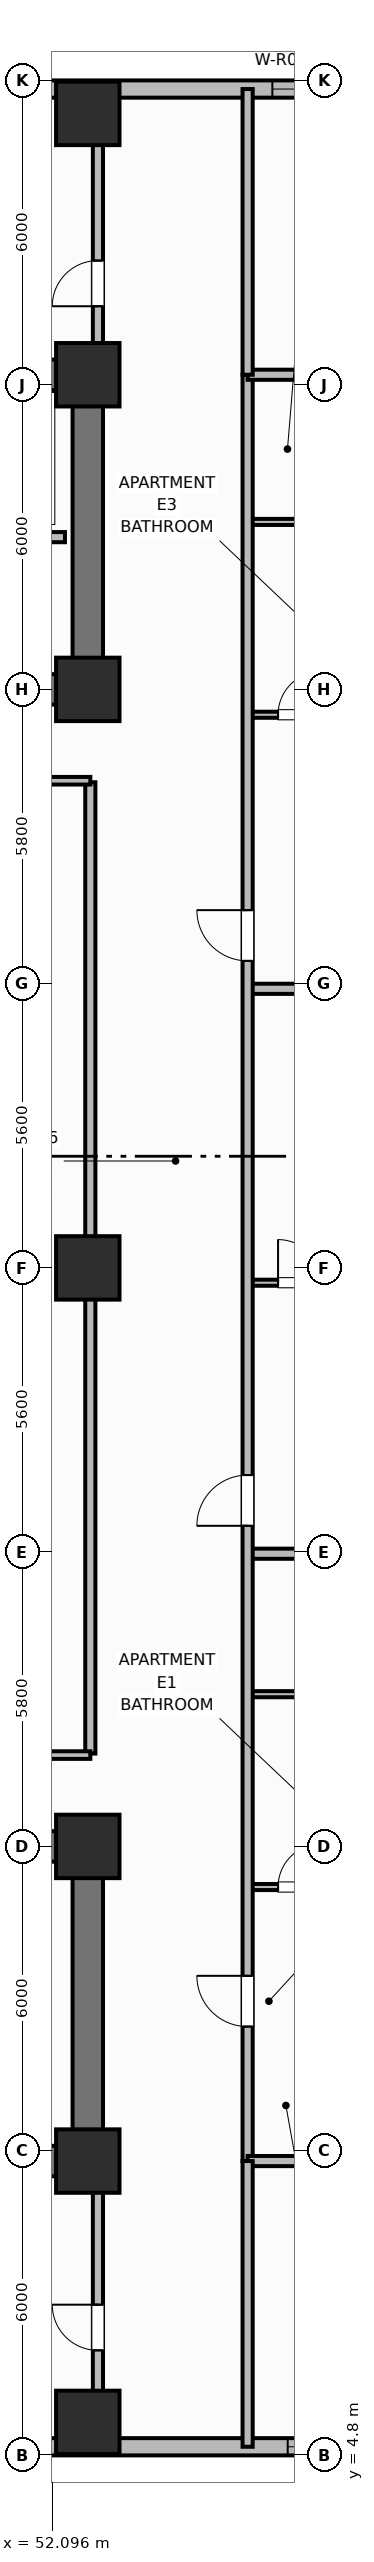
"""IFC4 building model, lengths in metres.
Left out: names, types, materials, properties, quantities, classifications, styles, units other than length and angle.
Written with IfcOpenShell. Run it as: python <this file> out.ifc"""

import sys

from ifc_helpers import new_model, si_unit, direction, frame, frame_2d, origin, origin_2d, place, context, subcontext, project, spatial, rectangle, extrude, element, fill, save


model = new_model("IFC4")
c1 = context("Model", 3, precision=1e-05, world=origin(), true_north=direction((0.0, 1.0)))
c2 = subcontext(c1, "Body", "Model", "MODEL_VIEW")
j1 = project(units=[si_unit("LENGTHUNIT", "METRE"), si_unit("PLANEANGLEUNIT", "RADIAN")], contexts=[c1])
p1 = place(None, origin())
s1 = spatial("IfcSite", under=j1, at=p1, CompositionType="ELEMENT")
p2 = place(p1, origin())
s2 = spatial("IfcBuilding", under=s1, at=p2, CompositionType="ELEMENT")
p3 = place(p2, frame((0.0, 0.0, 28.8)))
s3 = spatial("IfcBuildingStorey", under=s2, at=p3, CompositionType="ELEMENT", Elevation=28.8)
p4 = place(p3, frame((52.8, 10.6, 0.0), z_axis=(0.0, 0.0, 1.0), x_axis=(-1.0, 0.0, 0.0)))
e1 = element("IfcWall", 1, at=p4, inside=s3, PredefinedType="SHEAR", context=c2, shape_type="SweptSolid", body=[
    extrude(rectangle(XDim=27.2, YDim=0.6, at=frame_2d((13.6, 0.0))), origin(), (0.0, 0.0, 1.0), 3.7),
])
p5 = place(p3, frame((52.8, 10.9, 0.0), z_axis=(0.0, 0.0, 1.0), x_axis=(0.0, 1.0, 0.0)))
e2 = element("IfcWall", 2, at=p5, inside=s3, PredefinedType="SHEAR", context=c2, shape_type="SweptSolid", body=[
    extrude(rectangle(XDim=5.6, YDim=0.6, at=frame_2d((2.8, 0.0))), origin(), (0.0, 0.0, 1.0), 3.7),
])
p6 = place(p3, frame((25.6, 16.8, 0.0), z_axis=(0.0, 0.0, 1.0), x_axis=(1.0, 0.0, 0.0)))
e3 = element("IfcWall", 3, at=p6, inside=s3, PredefinedType="SHEAR", context=c2, shape_type="SweptSolid", body=[
    extrude(rectangle(XDim=27.2, YDim=0.6, at=frame_2d((13.6, 0.0))), origin(), (0.0, 0.0, 1.0), 3.7),
])
p7 = place(p6, frame((1.9, 0.0, 0.0)))
e4 = element("IfcOpeningElement", 4, at=p7, cuts=e3, PredefinedType="OPENING", context=c2, shape_type="SweptSolid", body=[
    extrude(rectangle(XDim=1.1, YDim=2.15, at=frame_2d((0.55, 1.075))), frame((0.0, 0.31, 0.0), z_axis=(0.0, -1.0, 0.0), x_axis=(1.0, 0.0, 0.0)), (0.0, 0.0, 1.0), 0.62),
])
p8 = place(p6, frame((13.0, 0.0, 0.0)))
e5 = element("IfcOpeningElement", 5, at=p8, cuts=e3, PredefinedType="OPENING", context=c2, shape_type="SweptSolid", body=[
    extrude(rectangle(XDim=1.2, YDim=2.15, at=frame_2d((0.6, 1.075))), frame((0.0, 0.31, 0.0), z_axis=(0.0, -1.0, 0.0), x_axis=(1.0, 0.0, 0.0)), (0.0, 0.0, 1.0), 0.62),
])
p9 = place(p6, frame((20.4, 0.0, 0.0)))
e6 = element("IfcOpeningElement", 6, at=p9, cuts=e3, PredefinedType="OPENING", context=c2, shape_type="SweptSolid", body=[
    extrude(rectangle(XDim=1.3, YDim=2.2, at=frame_2d((0.65, 1.1))), frame((0.0, 0.31, 0.0), z_axis=(0.0, -1.0, 0.0), x_axis=(1.0, 0.0, 0.0)), (0.0, 0.0, 1.0), 0.62),
])
p10 = place(p6, frame((24.65, 0.0, 0.0)))
e7 = element("IfcOpeningElement", 7, at=p10, cuts=e3, PredefinedType="OPENING", context=c2, shape_type="SweptSolid", body=[
    extrude(rectangle(XDim=0.85, YDim=2.1, at=frame_2d((0.425, 1.05))), frame((0.0, 0.31, 0.0), z_axis=(0.0, -1.0, 0.0), x_axis=(1.0, 0.0, 0.0)), (0.0, 0.0, 1.0), 0.62),
])
p11 = place(p3, frame((25.6, 45.8, 0.0), z_axis=(0.0, 0.0, 1.0), x_axis=(1.0, 0.0, 0.0)))
e8 = element("IfcWall", 8, at=p11, inside=s3, PredefinedType="SHEAR", context=c2, shape_type="SweptSolid", body=[
    extrude(rectangle(XDim=27.2, YDim=0.6, at=frame_2d((13.6, 0.0))), origin(), (0.0, 0.0, 1.0), 3.7),
])
p12 = place(p3, frame((52.8, 39.9, 0.0), z_axis=(0.0, 0.0, 1.0), x_axis=(0.0, 1.0, 0.0)))
e9 = element("IfcWall", 9, at=p12, inside=s3, PredefinedType="SHEAR", context=c2, shape_type="SweptSolid", body=[
    extrude(rectangle(XDim=5.6, YDim=0.6, at=frame_2d((2.8, 0.0))), origin(), (0.0, 0.0, 1.0), 3.7),
])
p13 = place(p3, frame((52.8, 39.6, 0.0), z_axis=(0.0, 0.0, 1.0), x_axis=(-1.0, 0.0, 0.0)))
e10 = element("IfcWall", 10, at=p13, inside=s3, PredefinedType="SHEAR", context=c2, shape_type="SweptSolid", body=[
    extrude(rectangle(XDim=27.2, YDim=0.6, at=frame_2d((13.6, 0.0))), origin(), (0.0, 0.0, 1.0), 3.7),
])
p14 = place(p13, frame((24.2, 0.0, 0.0)))
e11 = element("IfcOpeningElement", 11, at=p14, cuts=e10, PredefinedType="OPENING", context=c2, shape_type="SweptSolid", body=[
    extrude(rectangle(XDim=1.1, YDim=2.15, at=frame_2d((0.55, 1.075))), frame((0.0, 0.31, 0.0), z_axis=(0.0, -1.0, 0.0), x_axis=(1.0, 0.0, 0.0)), (0.0, 0.0, 1.0), 0.62),
])
p15 = place(p13, frame((15.1, 0.0, 0.0)))
e12 = element("IfcOpeningElement", 12, at=p15, cuts=e10, PredefinedType="OPENING", context=c2, shape_type="SweptSolid", body=[
    extrude(rectangle(XDim=1.2, YDim=2.15, at=frame_2d((0.6, 1.075))), frame((0.0, 0.31, 0.0), z_axis=(0.0, -1.0, 0.0), x_axis=(1.0, 0.0, 0.0)), (0.0, 0.0, 1.0), 0.62),
])
p16 = place(p13, frame((11.6, 0.0, 0.0)))
e13 = element("IfcOpeningElement", 13, at=p16, cuts=e10, PredefinedType="OPENING", context=c2, shape_type="SweptSolid", body=[
    extrude(rectangle(XDim=0.9, YDim=2.1, at=frame_2d((0.45, 1.05))), frame((0.0, 0.31, 0.0), z_axis=(0.0, -1.0, 0.0), x_axis=(1.0, 0.0, 0.0)), (0.0, 0.0, 1.0), 0.62),
])
p17 = place(p13, frame((3.6, 0.0, 0.0)))
e14 = element("IfcOpeningElement", 14, at=p17, cuts=e10, PredefinedType="OPENING", context=c2, shape_type="SweptSolid", body=[
    extrude(rectangle(XDim=1.0, YDim=2.15, at=frame_2d((0.5, 1.075))), frame((0.0, 0.31, 0.0), z_axis=(0.0, -1.0, 0.0), x_axis=(1.0, 0.0, 0.0)), (0.0, 0.0, 1.0), 0.62),
])
for number, where, z_axis, x_axis in (
    (15, (52.8, 10.6, 0.0), (0.0, 0.0, 1.0), (1.0, 0.0, 0.0)),
    (16, (52.8, 16.8, 0.0), (0.0, 0.0, 1.0), (1.0, 0.0, 0.0)),
    (17, (52.8, 39.6, 0.0), (0.0, 0.0, 1.0), (1.0, 0.0, 0.0)),
    (18, (52.8, 45.8, 0.0), (0.0, 0.0, 1.0), (1.0, 0.0, 0.0)),
    (19, (52.8, 28.2, 0.0), (0.0, 0.0, 1.0), (1.0, 0.0, 0.0)),
    (20, (52.8, 5.45, 0.0), (0.0, 0.0, 1.0), (1.0, 0.0, 0.0)),
    (21, (52.8, 50.95, 0.0), (0.0, 0.0, 1.0), (1.0, 0.0, 0.0)),
):
    element("IfcColumn", number, at=place(p3, frame(where, z_axis=z_axis, x_axis=x_axis)), inside=s3, PredefinedType="COLUMN", context=c2, shape_type="SweptSolid", body=[
        extrude(rectangle(XDim=1.25, YDim=1.25, at=origin_2d()), origin(), (0.0, 0.0, 1.0), 3.7),
    ])
p18 = place(p3, frame((42.4, 4.97, 0.0), z_axis=(0.0, 0.0, 1.0), x_axis=(1.0, 0.0, 0.0)))
e22 = element("IfcWall", 22, at=p18, inside=s3, PredefinedType="SOLIDWALL", context=c2, shape_type="SweptSolid", body=[
    extrude(rectangle(XDim=17.4, YDim=0.34, at=frame_2d((8.7, 0.0))), origin(), (0.0, 0.0, 1.0), 2.7),
])
p19 = place(p18, frame((4.68, 0.0, 0.68)))
e23 = element("IfcOpeningElement", 23, at=p19, cuts=e22, PredefinedType="OPENING", context=c2, shape_type="SweptSolid", body=[
    extrude(rectangle(XDim=1.6, YDim=1.9, at=frame_2d((0.8, 0.95))), frame((0.0, 0.18, 0.0), z_axis=(0.0, -1.0, 0.0), x_axis=(1.0, 0.0, 0.0)), (0.0, 0.0, 1.0), 0.36),
])
p20 = place(p18, frame((7.55, 0.0, 0.68)))
e24 = element("IfcOpeningElement", 24, at=p20, cuts=e22, PredefinedType="OPENING", context=c2, shape_type="SweptSolid", body=[
    extrude(rectangle(XDim=1.6, YDim=1.9, at=frame_2d((0.8, 0.95))), frame((0.0, 0.18, 0.0), z_axis=(0.0, -1.0, 0.0), x_axis=(1.0, 0.0, 0.0)), (0.0, 0.0, 1.0), 0.36),
])
p21 = place(p18, frame((14.34, 0.0, 0.68)))
e25 = element("IfcOpeningElement", 25, at=p21, cuts=e22, PredefinedType="OPENING", context=c2, shape_type="SweptSolid", body=[
    extrude(rectangle(XDim=1.6, YDim=1.9, at=frame_2d((0.8, 0.95))), frame((0.0, 0.18, 0.0), z_axis=(0.0, -1.0, 0.0), x_axis=(1.0, 0.0, 0.0)), (0.0, 0.0, 1.0), 0.36),
])
p22 = place(p3, frame((59.8, 51.43, 0.0), z_axis=(0.0, 0.0, 1.0), x_axis=(-1.0, 0.0, 0.0)))
e26 = element("IfcWall", 26, at=p22, inside=s3, PredefinedType="SOLIDWALL", context=c2, shape_type="SweptSolid", body=[
    extrude(rectangle(XDim=17.4, YDim=0.34, at=frame_2d((8.7, 0.0))), origin(), (0.0, 0.0, 1.0), 2.7),
])
p23 = place(p22, frame((1.262, 0.0, 0.68)))
e27 = element("IfcOpeningElement", 27, at=p23, cuts=e26, PredefinedType="OPENING", context=c2, shape_type="SweptSolid", body=[
    extrude(rectangle(XDim=2.1, YDim=1.9, at=frame_2d((1.05, 0.95))), frame((0.0, 0.18, 0.0), z_axis=(0.0, -1.0, 0.0), x_axis=(1.0, 0.0, 0.0)), (0.0, 0.0, 1.0), 0.36),
])
p24 = place(p22, frame((9.663, 0.0, 0.68)))
e28 = element("IfcOpeningElement", 28, at=p24, cuts=e26, PredefinedType="OPENING", context=c2, shape_type="SweptSolid", body=[
    extrude(rectangle(XDim=2.1, YDim=1.9, at=frame_2d((1.05, 0.95))), frame((0.0, 0.18, 0.0), z_axis=(0.0, -1.0, 0.0), x_axis=(1.0, 0.0, 0.0)), (0.0, 0.0, 1.0), 0.36),
])
p25 = place(p3, frame((52.35, 42.6, 0.0), z_axis=(0.0, 0.0, 1.0), x_axis=(-1.0, 0.0, 0.0)))
e29 = element("IfcWall", 29, at=p25, inside=s3, PredefinedType="PARTITIONING", context=c2, shape_type="SweptSolid", body=[
    extrude(rectangle(XDim=8.8, YDim=0.2, at=frame_2d((4.4, 0.0))), origin(), (0.0, 0.0, 1.0), 2.53),
])
p26 = place(p3, frame((52.85, 18.63, 0.0), z_axis=(0.0, 0.0, 1.0), x_axis=(0.0, 1.0, 0.0)))
e30 = element("IfcWall", 30, at=p26, inside=s3, PredefinedType="PARTITIONING", context=c2, shape_type="SweptSolid", body=[
    extrude(rectangle(XDim=19.14, YDim=0.2, at=frame_2d((9.57, 0.0))), origin(), (0.0, 0.0, 1.0), 2.53),
])
for number, where, z_axis, x_axis in (
    (31, (40.35, 18.6, 0.0), (0.0, 0.0, 1.0), (1.0, 0.0, 0.0)),
    (32, (40.35, 37.8, 0.0), (0.0, 0.0, 1.0), (1.0, 0.0, 0.0)),
):
    element("IfcWall", number, at=place(p3, frame(where, z_axis=z_axis, x_axis=x_axis)), inside=s3, PredefinedType="PARTITIONING", context=c2, shape_type="SweptSolid", body=[
        extrude(rectangle(XDim=12.5, YDim=0.15, at=frame_2d((6.25, 0.0))), origin(), (0.0, 0.0, 1.0), 2.53),
    ])
p27 = place(p3, frame((55.95, 16.0, 0.0), z_axis=(0.0, 0.0, 1.0), x_axis=(1.0, 0.0, 0.0)))
e33 = element("IfcWall", 33, at=p27, inside=s3, PredefinedType="PARTITIONING", context=c2, shape_type="SweptSolid", body=[
    extrude(rectangle(XDim=2.25, YDim=0.12, at=frame_2d((1.125, 0.0))), origin(), (0.0, 0.0, 1.0), 2.53),
])
p28 = place(p27, frame((0.6, 0.0, 0.0)))
e34 = element("IfcOpeningElement", 34, at=p28, cuts=e33, PredefinedType="OPENING", context=c2, shape_type="SweptSolid", body=[
    extrude(rectangle(XDim=0.85, YDim=2.1, at=frame_2d((0.425, 1.05))), frame((0.0, 0.07, 0.0), z_axis=(0.0, -1.0, 0.0), x_axis=(1.0, 0.0, 0.0)), (0.0, 0.0, 1.0), 0.14),
])
p29 = place(p3, frame((55.95, 19.8, 0.0), z_axis=(0.0, 0.0, 1.0), x_axis=(1.0, 0.0, 0.0)))
e35 = element("IfcWall", 35, at=p29, inside=s3, PredefinedType="PARTITIONING", context=c2, shape_type="SweptSolid", body=[
    extrude(rectangle(XDim=2.25, YDim=0.12, at=frame_2d((1.125, 0.0))), origin(), (0.0, 0.0, 1.0), 2.53),
])
p30 = place(p3, frame((55.95, 22.568, 0.0), z_axis=(0.0, 0.0, 1.0), x_axis=(1.0, 0.0, 0.0)))
e36 = element("IfcWall", 36, at=p30, inside=s3, PredefinedType="PARTITIONING", context=c2, shape_type="SweptSolid", body=[
    extrude(rectangle(XDim=7.88, YDim=0.2, at=frame_2d((3.94, 0.0))), origin(), (0.0, 0.0, 1.0), 2.53),
])
p31 = place(p3, frame((55.95, 27.908, 0.0), z_axis=(0.0, 0.0, 1.0), x_axis=(1.0, 0.0, 0.0)))
e37 = element("IfcWall", 37, at=p31, inside=s3, PredefinedType="PARTITIONING", context=c2, shape_type="SweptSolid", body=[
    extrude(rectangle(XDim=2.25, YDim=0.12, at=frame_2d((1.125, 0.0))), origin(), (0.0, 0.0, 1.0), 2.53),
])
p32 = place(p31, frame((0.6, 0.0, 0.0)))
e38 = element("IfcOpeningElement", 38, at=p32, cuts=e37, PredefinedType="OPENING", context=c2, shape_type="SweptSolid", body=[
    extrude(rectangle(XDim=0.85, YDim=2.1, at=frame_2d((0.425, 1.05))), frame((0.0, 0.07, 0.0), z_axis=(0.0, -1.0, 0.0), x_axis=(1.0, 0.0, 0.0)), (0.0, 0.0, 1.0), 0.14),
])
p33 = place(p3, frame((55.95, 33.7, 0.0), z_axis=(0.0, 0.0, 1.0), x_axis=(1.0, 0.0, 0.0)))
e39 = element("IfcWall", 39, at=p33, inside=s3, PredefinedType="PARTITIONING", context=c2, shape_type="SweptSolid", body=[
    extrude(rectangle(XDim=7.88, YDim=0.2, at=frame_2d((3.94, 0.0))), origin(), (0.0, 0.0, 1.0), 2.53),
])
p34 = place(p3, frame((55.95, 39.1, 0.0), z_axis=(0.0, 0.0, 1.0), x_axis=(1.0, 0.0, 0.0)))
e40 = element("IfcWall", 40, at=p34, inside=s3, PredefinedType="PARTITIONING", context=c2, shape_type="SweptSolid", body=[
    extrude(rectangle(XDim=2.25, YDim=0.12, at=frame_2d((1.125, 0.0))), origin(), (0.0, 0.0, 1.0), 2.53),
])
p35 = place(p34, frame((0.6, 0.0, 0.0)))
e41 = element("IfcOpeningElement", 41, at=p35, cuts=e40, PredefinedType="OPENING", context=c2, shape_type="SweptSolid", body=[
    extrude(rectangle(XDim=0.85, YDim=2.1, at=frame_2d((0.425, 1.05))), frame((0.0, 0.07, 0.0), z_axis=(0.0, -1.0, 0.0), x_axis=(1.0, 0.0, 0.0)), (0.0, 0.0, 1.0), 0.14),
])
p36 = place(p3, frame((55.95, 42.9, 0.0), z_axis=(0.0, 0.0, 1.0), x_axis=(1.0, 0.0, 0.0)))
e42 = element("IfcWall", 42, at=p36, inside=s3, PredefinedType="PARTITIONING", context=c2, shape_type="SweptSolid", body=[
    extrude(rectangle(XDim=2.25, YDim=0.12, at=frame_2d((1.125, 0.0))), origin(), (0.0, 0.0, 1.0), 2.53),
])
p37 = place(p3, frame((55.95, 10.6, 0.0), z_axis=(0.0, 0.0, 1.0), x_axis=(0.0, 1.0, 0.0)))
e43 = element("IfcWall", 43, at=p37, inside=s3, PredefinedType="PARTITIONING", context=c2, shape_type="SweptSolid", body=[
    extrude(rectangle(XDim=35.2, YDim=0.2, at=frame_2d((17.6, 0.0))), origin(), (0.0, 0.0, 1.0), 2.53),
])
p38 = place(p37, frame((2.65, 0.0, 0.0)))
e44 = element("IfcOpeningElement", 44, at=p38, cuts=e43, PredefinedType="OPENING", context=c2, shape_type="SweptSolid", body=[
    extrude(rectangle(XDim=1.0, YDim=2.15, at=frame_2d((0.5, 1.075))), frame((0.0, 0.11, 0.0), z_axis=(0.0, -1.0, 0.0), x_axis=(1.0, 0.0, 0.0)), (0.0, 0.0, 1.0), 0.22),
])
p39 = place(p37, frame((12.518, 0.0, 0.0)))
e45 = element("IfcOpeningElement", 45, at=p39, cuts=e43, PredefinedType="OPENING", context=c2, shape_type="SweptSolid", body=[
    extrude(rectangle(XDim=1.0, YDim=2.15, at=frame_2d((0.5, 1.075))), frame((0.0, 0.11, 0.0), z_axis=(0.0, -1.0, 0.0), x_axis=(1.0, 0.0, 0.0)), (0.0, 0.0, 1.0), 0.22),
])
p40 = place(p37, frame((23.65, 0.0, 0.0)))
e46 = element("IfcOpeningElement", 46, at=p40, cuts=e43, PredefinedType="OPENING", context=c2, shape_type="SweptSolid", body=[
    extrude(rectangle(XDim=1.0, YDim=2.15, at=frame_2d((0.5, 1.075))), frame((0.0, 0.11, 0.0), z_axis=(0.0, -1.0, 0.0), x_axis=(1.0, 0.0, 0.0)), (0.0, 0.0, 1.0), 0.22),
])
for number, where, z_axis, x_axis in (
    (47, (55.95, 10.6, 0.0), (0.0, 0.0, 1.0), (1.0, 0.0, 0.0)),
    (48, (55.95, 45.8, 0.0), (0.0, 0.0, 1.0), (1.0, 0.0, 0.0)),
):
    element("IfcWall", number, at=place(p3, frame(where, z_axis=z_axis, x_axis=x_axis)), inside=s3, PredefinedType="PARTITIONING", context=c2, shape_type="SweptSolid", body=[
        extrude(rectangle(XDim=7.46, YDim=0.2, at=frame_2d((3.73, 0.0))), origin(), (0.0, 0.0, 1.0), 2.53),
    ])
p41 = place(p3, frame((55.95, 4.97, 0.0), z_axis=(0.0, 0.0, 1.0), x_axis=(0.0, 1.0, 0.0)))
e49 = element("IfcWall", 49, at=p41, inside=s3, PredefinedType="PARTITIONING", context=c2, shape_type="SweptSolid", body=[
    extrude(rectangle(XDim=5.63, YDim=0.2, at=frame_2d((2.815, 0.0))), origin(), (0.0, 0.0, 1.0), 2.53),
])
p42 = place(p3, frame((55.95, 45.8, 0.0), z_axis=(0.0, 0.0, 1.0), x_axis=(0.0, 1.0, 0.0)))
e50 = element("IfcWall", 50, at=p42, inside=s3, PredefinedType="PARTITIONING", context=c2, shape_type="SweptSolid", body=[
    extrude(rectangle(XDim=5.63, YDim=0.2, at=frame_2d((2.815, 0.0))), origin(), (0.0, 0.0, 1.0), 2.53),
])
p43 = place(p3, frame((53.0, 5.57, 0.0), z_axis=(0.0, 0.0, 1.0), x_axis=(0.0, 1.0, 0.0)))
e51 = element("IfcWall", 51, at=p43, inside=s3, PredefinedType="PARTITIONING", context=c2, shape_type="SweptSolid", body=[
    extrude(rectangle(XDim=4.73, YDim=0.2, at=frame_2d((2.365, 0.0))), origin(), (0.0, 0.0, 1.0), 2.53),
])
p44 = place(p43, frame((1.3, 0.0, 0.0)))
e52 = element("IfcOpeningElement", 52, at=p44, cuts=e51, PredefinedType="OPENING", context=c2, shape_type="SweptSolid", body=[
    extrude(rectangle(XDim=0.9, YDim=2.1, at=frame_2d((0.45, 1.05))), frame((0.0, 0.11, 0.0), z_axis=(0.0, -1.0, 0.0), x_axis=(1.0, 0.0, 0.0)), (0.0, 0.0, 1.0), 0.22),
])
p45 = place(p3, frame((53.0, 46.1, 0.0), z_axis=(0.0, 0.0, 1.0), x_axis=(0.0, 1.0, 0.0)))
e53 = element("IfcWall", 53, at=p45, inside=s3, PredefinedType="PARTITIONING", context=c2, shape_type="SweptSolid", body=[
    extrude(rectangle(XDim=4.73, YDim=0.2, at=frame_2d((2.365, 0.0))), origin(), (0.0, 0.0, 1.0), 2.53),
])
p46 = place(p45, frame((1.05, 0.0, 0.0)))
e54 = element("IfcOpeningElement", 54, at=p46, cuts=e53, PredefinedType="OPENING", context=c2, shape_type="SweptSolid", body=[
    extrude(rectangle(XDim=0.9, YDim=2.1, at=frame_2d((0.45, 1.05))), frame((0.0, 0.11, 0.0), z_axis=(0.0, -1.0, 0.0), x_axis=(1.0, 0.0, 0.0)), (0.0, 0.0, 1.0), 0.22),
])
p47 = place(p21, origin())
e55 = element("IfcWindow", 55, at=p47, inside=s3, PartitioningType="SINGLE_PANEL", PredefinedType="WINDOW", context=c2, shape_type="SweptSolid", body=[
    extrude(rectangle(XDim=1.6, YDim=1.9, at=frame_2d((0.8, 0.95))), frame((0.0, 0.03, 0.0), z_axis=(0.0, -1.0, 0.0), x_axis=(1.0, 0.0, 0.0)), (0.0, 0.0, 1.0), 0.06),
])
fill(e25, e55)
p48 = place(p23, origin())
e56 = element("IfcWindow", 56, at=p48, inside=s3, PartitioningType="SINGLE_PANEL", PredefinedType="WINDOW", context=c2, shape_type="SweptSolid", body=[
    extrude(rectangle(XDim=2.1, YDim=1.9, at=frame_2d((1.05, 0.95))), frame((0.0, 0.03, 0.0), z_axis=(0.0, -1.0, 0.0), x_axis=(1.0, 0.0, 0.0)), (0.0, 0.0, 1.0), 0.06),
])
fill(e27, e56)
p49 = place(p28, origin())
e57 = element("IfcDoor", 57, at=p49, inside=s3, OperationType="SINGLE_SWING_RIGHT", PredefinedType="DOOR", context=c2, shape_type="SweptSolid", body=[
    extrude(rectangle(XDim=0.85, YDim=2.1, at=frame_2d((0.425, 1.05))), frame((0.0, 0.025, 0.0), z_axis=(0.0, -1.0, 0.0), x_axis=(1.0, 0.0, 0.0)), (0.0, 0.0, 1.0), 0.05),
])
fill(e34, e57)
p50 = place(p32, origin())
e58 = element("IfcDoor", 58, at=p50, inside=s3, OperationType="SINGLE_SWING_LEFT", PredefinedType="DOOR", context=c2, shape_type="SweptSolid", body=[
    extrude(rectangle(XDim=0.85, YDim=2.1, at=frame_2d((0.425, 1.05))), frame((0.0, 0.025, 0.0), z_axis=(0.0, -1.0, 0.0), x_axis=(1.0, 0.0, 0.0)), (0.0, 0.0, 1.0), 0.05),
])
fill(e38, e58)
p51 = place(p35, origin())
e59 = element("IfcDoor", 59, at=p51, inside=s3, OperationType="SINGLE_SWING_RIGHT", PredefinedType="DOOR", context=c2, shape_type="SweptSolid", body=[
    extrude(rectangle(XDim=0.85, YDim=2.1, at=frame_2d((0.425, 1.05))), frame((0.0, 0.025, 0.0), z_axis=(0.0, -1.0, 0.0), x_axis=(1.0, 0.0, 0.0)), (0.0, 0.0, 1.0), 0.05),
])
fill(e41, e59)
p52 = place(p38, origin())
e60 = element("IfcDoor", 60, at=p52, inside=s3, OperationType="SINGLE_SWING_RIGHT", PredefinedType="DOOR", context=c2, shape_type="SweptSolid", body=[
    extrude(rectangle(XDim=1.0, YDim=2.15, at=frame_2d((0.5, 1.075))), frame((0.0, 0.025, 0.0), z_axis=(0.0, -1.0, 0.0), x_axis=(1.0, 0.0, 0.0)), (0.0, 0.0, 1.0), 0.05),
])
fill(e44, e60)
p53 = place(p39, origin())
e61 = element("IfcDoor", 61, at=p53, inside=s3, OperationType="SINGLE_SWING_LEFT", PredefinedType="DOOR", context=c2, shape_type="SweptSolid", body=[
    extrude(rectangle(XDim=1.0, YDim=2.15, at=frame_2d((0.5, 1.075))), frame((0.0, 0.025, 0.0), z_axis=(0.0, -1.0, 0.0), x_axis=(1.0, 0.0, 0.0)), (0.0, 0.0, 1.0), 0.05),
])
fill(e45, e61)
p54 = place(p40, origin())
e62 = element("IfcDoor", 62, at=p54, inside=s3, OperationType="SINGLE_SWING_RIGHT", PredefinedType="DOOR", context=c2, shape_type="SweptSolid", body=[
    extrude(rectangle(XDim=1.0, YDim=2.15, at=frame_2d((0.5, 1.075))), frame((0.0, 0.025, 0.0), z_axis=(0.0, -1.0, 0.0), x_axis=(1.0, 0.0, 0.0)), (0.0, 0.0, 1.0), 0.05),
])
fill(e46, e62)
p55 = place(p44, origin())
e63 = element("IfcDoor", 63, at=p55, inside=s3, OperationType="SINGLE_SWING_RIGHT", PredefinedType="DOOR", context=c2, shape_type="SweptSolid", body=[
    extrude(rectangle(XDim=0.9, YDim=2.1, at=frame_2d((0.45, 1.05))), frame((0.0, 0.025, 0.0), z_axis=(0.0, -1.0, 0.0), x_axis=(1.0, 0.0, 0.0)), (0.0, 0.0, 1.0), 0.05),
])
fill(e52, e63)
p56 = place(p46, origin())
e64 = element("IfcDoor", 64, at=p56, inside=s3, OperationType="SINGLE_SWING_LEFT", PredefinedType="DOOR", context=c2, shape_type="SweptSolid", body=[
    extrude(rectangle(XDim=0.9, YDim=2.1, at=frame_2d((0.45, 1.05))), frame((0.0, 0.025, 0.0), z_axis=(0.0, -1.0, 0.0), x_axis=(1.0, 0.0, 0.0)), (0.0, 0.0, 1.0), 0.05),
])
fill(e54, e64)
save(model, sys.argv[1])
